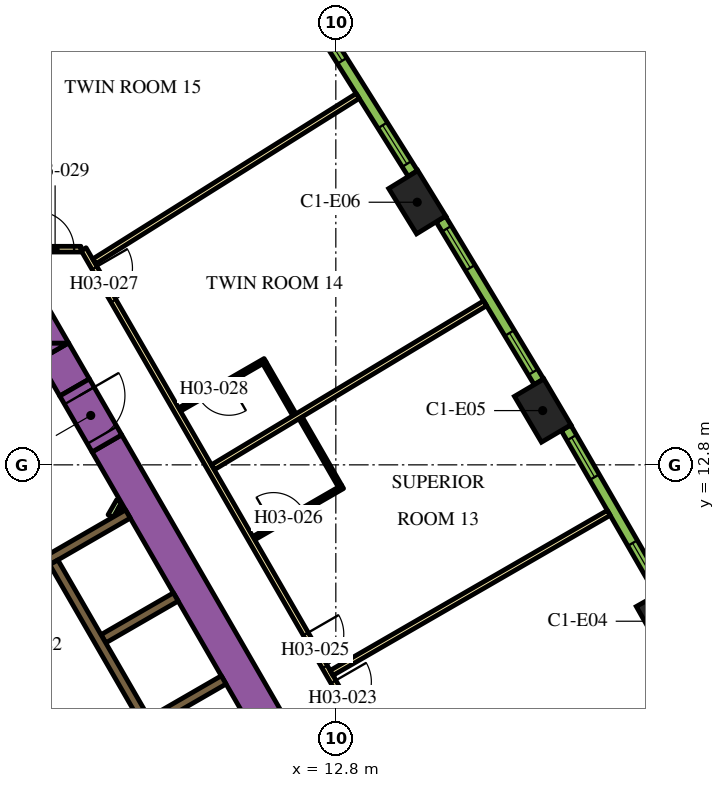
"""IFC4 building model, lengths in metres.
Left out: names, types, materials, properties, quantities, classifications, styles, units other than length and angle.
Written with IfcOpenShell. Run it as: python <this file> out.ifc"""

import sys

from ifc_helpers import new_model, si_unit, direction, frame, frame_2d, origin, origin_2d, place, context, subcontext, project, spatial, polyline, rectangle, outline, extrude, element, fill, save


model = new_model("IFC4")
c1 = context("Model", 3, precision=1e-05, world=origin(), true_north=direction((0.0, 1.0)))
c2 = subcontext(c1, "Body", "Model", "MODEL_VIEW")
j1 = project(units=[si_unit("LENGTHUNIT", "METRE"), si_unit("PLANEANGLEUNIT", "RADIAN")], contexts=[c1])
p1 = place(None, origin())
s1 = spatial("IfcSite", under=j1, at=p1, CompositionType="ELEMENT")
p2 = place(p1, origin())
s2 = spatial("IfcBuilding", under=s1, at=p2, CompositionType="ELEMENT")
p3 = place(p2, frame((0.0, 0.0, 51.0)))
s3 = spatial("IfcBuildingStorey", under=s2, at=p3, CompositionType="ELEMENT", Elevation=51.0)
for number, where, z_axis, x_axis in (
    (1, (21.443, 8.685, 0.0), (0.0, 0.0, 1.0), (-0.492, 0.871, 0.0)),
    (2, (18.243, 14.228, 0.0), (0.0, 0.0, 1.0), (-0.508, 0.861, 0.0)),
    (3, (14.942, 19.71, 0.0), (0.0, 0.0, 1.0), (-0.524, 0.852, 0.0)),
):
    element("IfcColumn", number, at=place(p3, frame(where, z_axis=z_axis, x_axis=x_axis)), inside=s3, PredefinedType="COLUMN", context=c2, shape_type="SweptSolid", body=[
        extrude(rectangle(XDim=1.4, YDim=0.9, at=origin_2d()), origin(), (0.0, 0.0, 1.0), 3.9),
    ])
p4 = place(p3, frame((6.776, 13.364, 0.0), z_axis=(0.0, 0.0, 1.0), x_axis=(0.500004177138, -0.8660229921, 0.0)))
e4 = element("IfcWall", 4, at=p4, inside=s3, PredefinedType="SOLIDWALL", context=c2, shape_type="SweptSolid", body=[
    extrude(rectangle(XDim=20.204, YDim=0.9, at=frame_2d((10.102, 0.0))), origin(), (0.0, 0.0, 1.0), 3.9),
])
p5 = place(p3, origin())
e5 = element("IfcWall", 5, at=p5, inside=s3, PredefinedType="SOLIDWALL", context=c2, shape_type="SweptSolid", body=[
    extrude(outline(polyline([(5.265, 16.0), (5.265, 16.88), (5.773, 16.0), (5.265, 16.0)])), origin(), (0.0, 0.0, 1.0), 3.9),
])
p6 = place(p3, frame((5.926, 14.836, 0.0), z_axis=(0.0, 0.0, 1.0), x_axis=(-0.500076735116, 0.865981096212, 0.0)))
e6 = element("IfcWall", 6, at=p6, inside=s3, PredefinedType="SOLIDWALL", context=c2, shape_type="SweptSolid", body=[
    extrude(rectangle(XDim=1.094, YDim=0.9, at=frame_2d((0.547, 0.0))), origin(), (0.0, 0.0, 1.0), 3.9),
])
e7 = element("IfcWall", 7, at=p5, inside=s3, PredefinedType="SOLIDWALL", context=c2, shape_type="SweptSolid", body=[
    extrude(outline(polyline([(4.734, 16.0), (5.75, 16.0), (4.988, 15.56), (4.734, 16.0)])), origin(), (0.0, 0.0, 1.0), 3.9),
])
for number, where, z_axis, x_axis in (
    (8, (7.944, 6.041, 0.0), (0.0, 0.0, 1.0), (0.866, 0.5, 0.0)),
    (9, (6.684, 8.224, 0.0), (0.0, 0.0, 1.0), (0.866, 0.5, 0.0)),
):
    element("IfcWall", number, at=place(p3, frame(where, z_axis=z_axis, x_axis=x_axis)), inside=s3, PredefinedType="SOLIDWALL", context=c2, shape_type="SweptSolid", body=[
        extrude(rectangle(XDim=2.2, YDim=0.25, at=frame_2d((1.1, 0.0))), origin(), (0.0, 0.0, 1.0), 3.9),
    ])
e10 = element("IfcWall", 10, at=p5, inside=s3, PredefinedType="SOLIDWALL", context=c2, shape_type="SweptSolid", body=[
    extrude(outline(polyline([(5.27, 10.173), (5.27, 10.173), (4.683, 9.834), (4.504, 9.731), (4.442, 9.839), (4.431, 9.856), (4.419, 9.871), (4.406, 9.885), (4.39, 9.898), (4.374, 9.909), (4.357, 9.918), (4.341, 9.925), (7.266, 11.614), (7.391, 11.398), (5.486, 10.298), (5.486, 10.298), (5.27, 10.173), (5.27, 10.173)])), origin(), (0.0, 0.0, 1.0), 3.9),
])
p7 = place(p3, frame((5.97, -2.591, 0.0), z_axis=(0.0, 0.0, 1.0), x_axis=(-0.499994469932, 0.866028596547, 0.0)))
e11 = element("IfcWall", 11, at=p7, inside=s3, PredefinedType="SOLIDWALL", context=c2, shape_type="SweptSolid", body=[
    extrude(rectangle(XDim=10.488, YDim=0.25, at=frame_2d((5.244, 0.0))), origin(), (0.0, 0.0, 1.0), 3.9),
])
p8 = place(p3, frame((6.872, 11.45, 0.0), z_axis=(0.0, 0.0, 1.0), x_axis=(0.499846793097, 0.866113839764, 0.0)))
e12 = element("IfcWall", 12, at=p8, inside=s3, PredefinedType="PARTITIONING", context=c2, shape_type="SweptSolid", body=[
    extrude(rectangle(XDim=0.453, YDim=0.15, at=frame_2d((0.227, 0.0))), origin(), (0.0, 0.0, 1.0), 2.75),
])
p9 = place(p3, frame((7.131, 11.6, 0.0), z_axis=(0.0, 0.0, 1.0), x_axis=(0.498600033135, 0.866832167699, 0.0)))
e13 = element("IfcWall", 13, at=p9, inside=s3, PredefinedType="PARTITIONING", context=c2, shape_type="SweptSolid", body=[
    extrude(rectangle(XDim=0.107, YDim=0.15, at=frame_2d((0.053, 0.0))), origin(), (0.0, 0.0, 1.0), 2.75),
])
p10 = place(p3, frame((11.553, -0.46, 0.0), z_axis=(0.0, 0.0, 1.0), x_axis=(-0.500006514828, 0.866021642414, 0.0)))
e14 = element("IfcWall", 14, at=p10, inside=s3, PredefinedType="SOLIDWALL", context=c2, shape_type="SweptSolid", body=[
    extrude(rectangle(XDim=12.35, YDim=0.25, at=frame_2d((6.175, 0.0))), origin(), (0.0, 0.0, 1.0), 3.9),
])
p11 = place(p10, frame((0.585, 0.0, 0.0)))
e15 = element("IfcOpeningElement", 15, at=p11, cuts=e14, PredefinedType="OPENING", context=c2, shape_type="SweptSolid", body=[
    extrude(rectangle(XDim=1.1, YDim=2.1, at=frame_2d((0.55, 1.05))), frame((0.0, 0.135, 0.0), z_axis=(0.0, -1.0, 0.0), x_axis=(1.0, 0.0, 0.0)), (0.0, 0.0, 1.0), 0.27),
])
p12 = place(p10, frame((3.105, 0.0, 0.0)))
e16 = element("IfcOpeningElement", 16, at=p12, cuts=e14, PredefinedType="OPENING", context=c2, shape_type="SweptSolid", body=[
    extrude(rectangle(XDim=1.1, YDim=2.1, at=frame_2d((0.55, 1.05))), frame((0.0, 0.135, 0.0), z_axis=(0.0, -1.0, 0.0), x_axis=(1.0, 0.0, 0.0)), (0.0, 0.0, 1.0), 0.27),
])
p13 = place(p10, frame((5.625, 0.0, 0.0)))
e17 = element("IfcOpeningElement", 17, at=p13, cuts=e14, PredefinedType="OPENING", context=c2, shape_type="SweptSolid", body=[
    extrude(rectangle(XDim=1.1, YDim=2.1, at=frame_2d((0.55, 1.05))), frame((0.0, 0.135, 0.0), z_axis=(0.0, -1.0, 0.0), x_axis=(1.0, 0.0, 0.0)), (0.0, 0.0, 1.0), 0.27),
])
p14 = place(p3, frame((8.565, -2.185, 0.0), z_axis=(0.0, 0.0, 1.0), x_axis=(-0.499997954832, 0.866026584559, 0.0)))
e18 = element("IfcWall", 18, at=p14, inside=s3, PredefinedType="SOLIDWALL", context=c2, shape_type="SweptSolid", body=[
    extrude(rectangle(XDim=12.35, YDim=0.25, at=frame_2d((6.175, 0.0))), origin(), (0.0, 0.0, 1.0), 3.9),
])
p15 = place(p14, frame((5.725, 0.0, 0.0)))
e19 = element("IfcOpeningElement", 19, at=p15, cuts=e18, PredefinedType="OPENING", context=c2, shape_type="SweptSolid", body=[
    extrude(rectangle(XDim=0.9, YDim=2.1, at=frame_2d((0.45, 1.05))), frame((0.0, 0.135, 0.0), z_axis=(0.0, -1.0, 0.0), x_axis=(1.0, 0.0, 0.0)), (0.0, 0.0, 1.0), 0.27),
])
p16 = place(p3, frame((5.926, 14.836, 0.0), z_axis=(0.0, 0.0, 1.0), x_axis=(0.500062241894, -0.865989465428, 0.0)))
e20 = element("IfcWall", 20, at=p16, inside=s3, PredefinedType="SOLIDWALL", context=c2, shape_type="SweptSolid", body=[
    extrude(rectangle(XDim=1.7, YDim=0.9, at=frame_2d((0.85, 0.0))), origin(), (0.0, 0.0, 1.0), 3.9),
])
p17 = place(p16, frame((0.25, 0.0, 0.0)))
e21 = element("IfcOpeningElement", 21, at=p17, cuts=e20, PredefinedType="OPENING", context=c2, shape_type="SweptSolid", body=[
    extrude(rectangle(XDim=1.2, YDim=2.1, at=frame_2d((0.6, 1.05))), frame((0.0, 0.46, 0.0), z_axis=(0.0, -1.0, 0.0), x_axis=(1.0, 0.0, 0.0)), (0.0, 0.0, 1.0), 0.92),
])
p18 = place(p3, frame((6.163, 18.475, 0.0), z_axis=(0.0, 0.0, 1.0), x_axis=(0.500001317485, -0.866024643133, 0.0)))
e22 = element("IfcWall", 22, at=p18, inside=s3, PredefinedType="PARTITIONING", context=c2, shape_type="SweptSolid", body=[
    extrude(rectangle(XDim=25.767, YDim=0.15, at=frame_2d((12.883, 0.0))), origin(), (0.0, 0.0, 1.0), 2.75),
])
p19 = place(p18, frame((24.586, 0.0, 0.0)))
e23 = element("IfcOpeningElement", 23, at=p19, cuts=e22, PredefinedType="OPENING", context=c2, shape_type="SweptSolid", body=[
    extrude(rectangle(XDim=1.0, YDim=2.1, at=frame_2d((0.5, 1.05))), frame((0.0, 0.085, 0.0), z_axis=(0.0, -1.0, 0.0), x_axis=(1.0, 0.0, 0.0)), (0.0, 0.0, 1.0), 0.17),
])
p20 = place(p18, frame((13.144, 0.0, 0.0)))
e24 = element("IfcOpeningElement", 24, at=p20, cuts=e22, PredefinedType="OPENING", context=c2, shape_type="SweptSolid", body=[
    extrude(rectangle(XDim=1.0, YDim=2.1, at=frame_2d((0.5, 1.05))), frame((0.0, 0.085, 0.0), z_axis=(0.0, -1.0, 0.0), x_axis=(1.0, 0.0, 0.0)), (0.0, 0.0, 1.0), 0.17),
])
p21 = place(p18, frame((11.692, 0.0, 0.0)))
e25 = element("IfcOpeningElement", 25, at=p21, cuts=e22, PredefinedType="OPENING", context=c2, shape_type="SweptSolid", body=[
    extrude(rectangle(XDim=1.0, YDim=2.1, at=frame_2d((0.5, 1.05))), frame((0.0, 0.085, 0.0), z_axis=(0.0, -1.0, 0.0), x_axis=(1.0, 0.0, 0.0)), (0.0, 0.0, 1.0), 0.17),
])
p22 = place(p18, frame((0.572, 0.0, 0.0)))
e26 = element("IfcOpeningElement", 26, at=p22, cuts=e22, PredefinedType="OPENING", context=c2, shape_type="SweptSolid", body=[
    extrude(rectangle(XDim=1.0, YDim=2.1, at=frame_2d((0.5, 1.05))), frame((0.0, 0.085, 0.0), z_axis=(0.0, -1.0, 0.0), x_axis=(1.0, 0.0, 0.0)), (0.0, 0.0, 1.0), 0.17),
])
p23 = place(p3, frame((0.825, 18.475, 0.0), z_axis=(0.0, 0.0, 1.0), x_axis=(1.0, 0.0, 0.0)))
e27 = element("IfcWall", 27, at=p23, inside=s3, PredefinedType="PARTITIONING", context=c2, shape_type="SweptSolid", body=[
    extrude(rectangle(XDim=5.268, YDim=0.15, at=frame_2d((2.634, 0.0))), origin(), (0.0, 0.0, 1.0), 2.75),
])
p24 = place(p23, frame((4.088, 0.0, 0.0)))
e28 = element("IfcOpeningElement", 28, at=p24, cuts=e27, PredefinedType="OPENING", context=c2, shape_type="SweptSolid", body=[
    extrude(rectangle(XDim=1.0, YDim=2.1, at=frame_2d((0.5, 1.05))), frame((0.0, 0.085, 0.0), z_axis=(0.0, -1.0, 0.0), x_axis=(1.0, 0.0, 0.0)), (0.0, 0.0, 1.0), 0.17),
])
p25 = place(p3, frame((9.922, 27.896, 0.0), z_axis=(0.0, 0.0, 1.0), x_axis=(-0.836970816595, -0.547247523675, 0.0)))
e29 = element("IfcWall", 29, at=p25, inside=s3, PredefinedType="PARTITIONING", context=c2, shape_type="SweptSolid", body=[
    extrude(rectangle(XDim=10.729, YDim=0.15, at=frame_2d((5.364, 0.0))), origin(), (0.0, 0.0, 1.0), 2.75),
])
p26 = place(p3, frame((13.376, 22.506, 0.0), z_axis=(0.0, 0.0, 1.0), x_axis=(-0.846945608893, -0.531679542183, 0.0)))
e30 = element("IfcWall", 30, at=p26, inside=s3, PredefinedType="PARTITIONING", context=c2, shape_type="SweptSolid", body=[
    extrude(rectangle(XDim=8.182, YDim=0.15, at=frame_2d((4.091, 0.0))), origin(), (0.0, 0.0, 1.0), 2.75),
])
p27 = place(p3, frame((16.729, 17.052, 0.0), z_axis=(0.0, 0.0, 1.0), x_axis=(-0.856630606266, -0.515930232113, 0.0)))
e31 = element("IfcWall", 31, at=p27, inside=s3, PredefinedType="PARTITIONING", context=c2, shape_type="SweptSolid", body=[
    extrude(rectangle(XDim=8.355, YDim=0.15, at=frame_2d((4.178, 0.0))), origin(), (0.0, 0.0, 1.0), 2.75),
])
p28 = place(p3, frame((19.982, 11.537, 0.0), z_axis=(0.0, 0.0, 1.0), x_axis=(-0.866020994654, -0.500007636761, 0.0)))
e32 = element("IfcWall", 32, at=p28, inside=s3, PredefinedType="PARTITIONING", context=c2, shape_type="SweptSolid", body=[
    extrude(rectangle(XDim=8.423, YDim=0.15, at=frame_2d((4.211, 0.0))), origin(), (0.0, 0.0, 1.0), 2.75),
])
p29 = place(p3, frame((10.64, 10.871, 0.0), z_axis=(0.0, 0.0, 1.0), x_axis=(0.866036505625, 0.499980770555, 0.0)))
e33 = element("IfcWall", 33, at=p29, inside=s3, PredefinedType="PARTITIONING", context=c2, shape_type="SweptSolid", body=[
    extrude(rectangle(XDim=2.7, YDim=0.1, at=frame_2d((1.35, 0.0))), origin(), (0.0, 0.0, 1.0), 2.75),
])
p30 = place(p29, frame((0.6, 0.0, 0.0)))
e34 = element("IfcOpeningElement", 34, at=p30, cuts=e33, PredefinedType="OPENING", context=c2, shape_type="SweptSolid", body=[
    extrude(rectangle(XDim=0.9, YDim=2.1, at=frame_2d((0.45, 1.05))), frame((0.0, 0.06, 0.0), z_axis=(0.0, -1.0, 0.0), x_axis=(1.0, 0.0, 0.0)), (0.0, 0.0, 1.0), 0.12),
])
p31 = place(p3, frame((12.91, 12.239, 0.0), z_axis=(0.0, 0.0, 1.0), x_axis=(-0.499957272447, 0.866050071143, 0.0)))
e35 = element("IfcWall", 35, at=p31, inside=s3, PredefinedType="PARTITIONING", context=c2, shape_type="SweptSolid", body=[
    extrude(rectangle(XDim=2.07, YDim=0.1, at=frame_2d((1.035, 0.0))), origin(), (0.0, 0.0, 1.0), 2.75),
])
p32 = place(p3, frame((10.938, 15.554, 0.0), z_axis=(0.0, 0.0, 1.0), x_axis=(-0.866062058628, -0.499936506574, 0.0)))
e36 = element("IfcWall", 36, at=p32, inside=s3, PredefinedType="PARTITIONING", context=c2, shape_type="SweptSolid", body=[
    extrude(rectangle(XDim=2.6, YDim=0.1, at=frame_2d((1.3, 0.0))), origin(), (0.0, 0.0, 1.0), 2.75),
])
p33 = place(p32, frame((1.1, 0.0, 0.0)))
e37 = element("IfcOpeningElement", 37, at=p33, cuts=e36, PredefinedType="OPENING", context=c2, shape_type="SweptSolid", body=[
    extrude(rectangle(XDim=0.9, YDim=2.1, at=frame_2d((0.45, 1.05))), frame((0.0, 0.06, 0.0), z_axis=(0.0, -1.0, 0.0), x_axis=(1.0, 0.0, 0.0)), (0.0, 0.0, 1.0), 0.12),
])
p34 = place(p3, frame((10.92, 15.486, 0.0), z_axis=(0.0, 0.0, 1.0), x_axis=(0.499994407638, -0.866028632512, 0.0)))
e38 = element("IfcWall", 38, at=p34, inside=s3, PredefinedType="PARTITIONING", context=c2, shape_type="SweptSolid", body=[
    extrude(rectangle(XDim=1.58, YDim=0.1, at=frame_2d((0.79, 0.0))), origin(), (0.0, 0.0, 1.0), 2.75),
])
p35 = place(p3, frame((21.357, 9.445, 0.0), z_axis=(0.0, 0.0, 1.0), x_axis=(-0.50002123722, 0.866013142123, 0.0)))
e39 = element("IfcWall", 39, at=p35, inside=s3, PredefinedType="SOLIDWALL", context=c2, shape_type="SweptSolid", body=[
    extrude(rectangle(XDim=4.998, YDim=0.29, at=frame_2d((2.499, 0.0))), origin(), (0.0, 0.0, 1.0), 3.65),
])
p36 = place(p35, frame((0.297, 0.0, 0.9)))
e40 = element("IfcOpeningElement", 40, at=p36, cuts=e39, PredefinedType="OPENING", context=c2, shape_type="SweptSolid", body=[
    extrude(rectangle(XDim=1.2, YDim=2.15, at=frame_2d((0.6, 1.075))), frame((0.0, 0.155, 0.0), z_axis=(0.0, -1.0, 0.0), x_axis=(1.0, 0.0, 0.0)), (0.0, 0.0, 1.0), 0.31),
])
p37 = place(p35, frame((3.501, 0.0, 0.9)))
e41 = element("IfcOpeningElement", 41, at=p37, cuts=e39, PredefinedType="OPENING", context=c2, shape_type="SweptSolid", body=[
    extrude(rectangle(XDim=1.2, YDim=2.15, at=frame_2d((0.6, 1.075))), frame((0.0, 0.155, 0.0), z_axis=(0.0, -1.0, 0.0), x_axis=(1.0, 0.0, 0.0)), (0.0, 0.0, 1.0), 0.31),
])
p38 = place(p3, frame((18.143, 14.986, 0.0), z_axis=(0.0, 0.0, 1.0), x_axis=(-0.515938796285, 0.856625448191, 0.0)))
e42 = element("IfcWall", 42, at=p38, inside=s3, PredefinedType="SOLIDWALL", context=c2, shape_type="SweptSolid", body=[
    extrude(rectangle(XDim=4.998, YDim=0.29, at=frame_2d((2.499, 0.0))), origin(), (0.0, 0.0, 1.0), 3.65),
])
p39 = place(p38, frame((0.297, 0.0, 0.9)))
e43 = element("IfcOpeningElement", 43, at=p39, cuts=e42, PredefinedType="OPENING", context=c2, shape_type="SweptSolid", body=[
    extrude(rectangle(XDim=1.2, YDim=2.15, at=frame_2d((0.6, 1.075))), frame((0.0, 0.155, 0.0), z_axis=(0.0, -1.0, 0.0), x_axis=(1.0, 0.0, 0.0)), (0.0, 0.0, 1.0), 0.31),
])
p40 = place(p38, frame((3.501, 0.0, 0.9)))
e44 = element("IfcOpeningElement", 44, at=p40, cuts=e42, PredefinedType="OPENING", context=c2, shape_type="SweptSolid", body=[
    extrude(rectangle(XDim=1.2, YDim=2.15, at=frame_2d((0.6, 1.075))), frame((0.0, 0.155, 0.0), z_axis=(0.0, -1.0, 0.0), x_axis=(1.0, 0.0, 0.0)), (0.0, 0.0, 1.0), 0.31),
])
p41 = place(p3, frame((14.827, 20.466, 0.0), z_axis=(0.0, 0.0, 1.0), x_axis=(-0.531688286542, 0.846940119462, 0.0)))
e45 = element("IfcWall", 45, at=p41, inside=s3, PredefinedType="SOLIDWALL", context=c2, shape_type="SweptSolid", body=[
    extrude(rectangle(XDim=4.998, YDim=0.29, at=frame_2d((2.499, 0.0))), origin(), (0.0, 0.0, 1.0), 3.65),
])
p42 = place(p41, frame((0.297, 0.0, 0.9)))
e46 = element("IfcOpeningElement", 46, at=p42, cuts=e45, PredefinedType="OPENING", context=c2, shape_type="SweptSolid", body=[
    extrude(rectangle(XDim=1.2, YDim=2.15, at=frame_2d((0.6, 1.075))), frame((0.0, 0.155, 0.0), z_axis=(0.0, -1.0, 0.0), x_axis=(1.0, 0.0, 0.0)), (0.0, 0.0, 1.0), 0.31),
])
p43 = place(p41, frame((3.501, 0.0, 0.9)))
e47 = element("IfcOpeningElement", 47, at=p43, cuts=e45, PredefinedType="OPENING", context=c2, shape_type="SweptSolid", body=[
    extrude(rectangle(XDim=1.2, YDim=2.15, at=frame_2d((0.6, 1.075))), frame((0.0, 0.155, 0.0), z_axis=(0.0, -1.0, 0.0), x_axis=(1.0, 0.0, 0.0)), (0.0, 0.0, 1.0), 0.31),
])
p44 = place(p17, origin())
e48 = element("IfcDoor", 48, at=p44, inside=s3, OperationType="SINGLE_SWING_LEFT", PredefinedType="DOOR", context=c2, shape_type="SweptSolid", body=[
    extrude(rectangle(XDim=1.2, YDim=2.1, at=frame_2d((0.6, 1.05))), frame((0.0, 0.025, 0.0), z_axis=(0.0, -1.0, 0.0), x_axis=(1.0, 0.0, 0.0)), (0.0, 0.0, 1.0), 0.05),
])
fill(e21, e48)
p45 = place(p20, origin())
e49 = element("IfcDoor", 49, at=p45, inside=s3, OperationType="SINGLE_SWING_LEFT", PredefinedType="DOOR", context=c2, shape_type="SweptSolid", body=[
    extrude(rectangle(XDim=1.0, YDim=2.1, at=frame_2d((0.5, 1.05))), frame((0.0, 0.025, 0.0), z_axis=(0.0, -1.0, 0.0), x_axis=(1.0, 0.0, 0.0)), (0.0, 0.0, 1.0), 0.05),
])
fill(e24, e49)
p46 = place(p21, origin())
e50 = element("IfcDoor", 50, at=p46, inside=s3, OperationType="SINGLE_SWING_RIGHT", PredefinedType="DOOR", context=c2, shape_type="SweptSolid", body=[
    extrude(rectangle(XDim=1.0, YDim=2.1, at=frame_2d((0.5, 1.05))), frame((0.0, 0.025, 0.0), z_axis=(0.0, -1.0, 0.0), x_axis=(1.0, 0.0, 0.0)), (0.0, 0.0, 1.0), 0.05),
])
fill(e25, e50)
p47 = place(p30, origin())
e51 = element("IfcDoor", 51, at=p47, inside=s3, OperationType="SINGLE_SWING_LEFT", PredefinedType="DOOR", context=c2, shape_type="SweptSolid", body=[
    extrude(rectangle(XDim=0.9, YDim=2.1, at=frame_2d((0.45, 1.05))), frame((0.0, 0.025, 0.0), z_axis=(0.0, -1.0, 0.0), x_axis=(1.0, 0.0, 0.0)), (0.0, 0.0, 1.0), 0.05),
])
fill(e34, e51)
p48 = place(p22, origin())
e52 = element("IfcDoor", 52, at=p48, inside=s3, OperationType="SINGLE_SWING_LEFT", PredefinedType="DOOR", context=c2, shape_type="SweptSolid", body=[
    extrude(rectangle(XDim=1.0, YDim=2.1, at=frame_2d((0.5, 1.05))), frame((0.0, 0.025, 0.0), z_axis=(0.0, -1.0, 0.0), x_axis=(1.0, 0.0, 0.0)), (0.0, 0.0, 1.0), 0.05),
])
fill(e26, e52)
p49 = place(p33, origin())
e53 = element("IfcDoor", 53, at=p49, inside=s3, OperationType="SINGLE_SWING_LEFT", PredefinedType="DOOR", context=c2, shape_type="SweptSolid", body=[
    extrude(rectangle(XDim=0.9, YDim=2.1, at=frame_2d((0.45, 1.05))), frame((0.0, 0.025, 0.0), z_axis=(0.0, -1.0, 0.0), x_axis=(1.0, 0.0, 0.0)), (0.0, 0.0, 1.0), 0.05),
])
fill(e37, e53)
p50 = place(p24, origin())
e54 = element("IfcDoor", 54, at=p50, inside=s3, OperationType="SINGLE_SWING_RIGHT", PredefinedType="DOOR", context=c2, shape_type="SweptSolid", body=[
    extrude(rectangle(XDim=1.0, YDim=2.1, at=frame_2d((0.5, 1.05))), frame((0.0, 0.025, 0.0), z_axis=(0.0, -1.0, 0.0), x_axis=(1.0, 0.0, 0.0)), (0.0, 0.0, 1.0), 0.05),
])
fill(e28, e54)
p51 = place(p36, origin())
e55 = element("IfcWindow", 55, at=p51, inside=s3, PartitioningType="DOUBLE_PANEL_VERTICAL", PredefinedType="WINDOW", context=c2, shape_type="SweptSolid", body=[
    extrude(rectangle(XDim=1.2, YDim=2.15, at=frame_2d((0.6, 1.075))), frame((0.0, 0.015, 0.0), z_axis=(0.0, -1.0, 0.0), x_axis=(1.0, 0.0, 0.0)), (0.0, 0.0, 1.0), 0.06),
])
fill(e40, e55)
p52 = place(p37, origin())
e56 = element("IfcWindow", 56, at=p52, inside=s3, PartitioningType="DOUBLE_PANEL_VERTICAL", PredefinedType="WINDOW", context=c2, shape_type="SweptSolid", body=[
    extrude(rectangle(XDim=1.2, YDim=2.15, at=frame_2d((0.6, 1.075))), frame((0.0, 0.015, 0.0), z_axis=(0.0, -1.0, 0.0), x_axis=(1.0, 0.0, 0.0)), (0.0, 0.0, 1.0), 0.06),
])
fill(e41, e56)
p53 = place(p39, origin())
e57 = element("IfcWindow", 57, at=p53, inside=s3, PartitioningType="DOUBLE_PANEL_VERTICAL", PredefinedType="WINDOW", context=c2, shape_type="SweptSolid", body=[
    extrude(rectangle(XDim=1.2, YDim=2.15, at=frame_2d((0.6, 1.075))), frame((0.0, 0.015, 0.0), z_axis=(0.0, -1.0, 0.0), x_axis=(1.0, 0.0, 0.0)), (0.0, 0.0, 1.0), 0.06),
])
fill(e43, e57)
p54 = place(p40, origin())
e58 = element("IfcWindow", 58, at=p54, inside=s3, PartitioningType="DOUBLE_PANEL_VERTICAL", PredefinedType="WINDOW", context=c2, shape_type="SweptSolid", body=[
    extrude(rectangle(XDim=1.2, YDim=2.15, at=frame_2d((0.6, 1.075))), frame((0.0, 0.015, 0.0), z_axis=(0.0, -1.0, 0.0), x_axis=(1.0, 0.0, 0.0)), (0.0, 0.0, 1.0), 0.06),
])
fill(e44, e58)
p55 = place(p42, origin())
e59 = element("IfcWindow", 59, at=p55, inside=s3, PartitioningType="DOUBLE_PANEL_VERTICAL", PredefinedType="WINDOW", context=c2, shape_type="SweptSolid", body=[
    extrude(rectangle(XDim=1.2, YDim=2.15, at=frame_2d((0.6, 1.075))), frame((0.0, 0.015, 0.0), z_axis=(0.0, -1.0, 0.0), x_axis=(1.0, 0.0, 0.0)), (0.0, 0.0, 1.0), 0.06),
])
fill(e46, e59)
p56 = place(p43, origin())
e60 = element("IfcWindow", 60, at=p56, inside=s3, PartitioningType="DOUBLE_PANEL_VERTICAL", PredefinedType="WINDOW", context=c2, shape_type="SweptSolid", body=[
    extrude(rectangle(XDim=1.2, YDim=2.15, at=frame_2d((0.6, 1.075))), frame((0.0, 0.015, 0.0), z_axis=(0.0, -1.0, 0.0), x_axis=(1.0, 0.0, 0.0)), (0.0, 0.0, 1.0), 0.06),
])
fill(e47, e60)
save(model, sys.argv[1])
